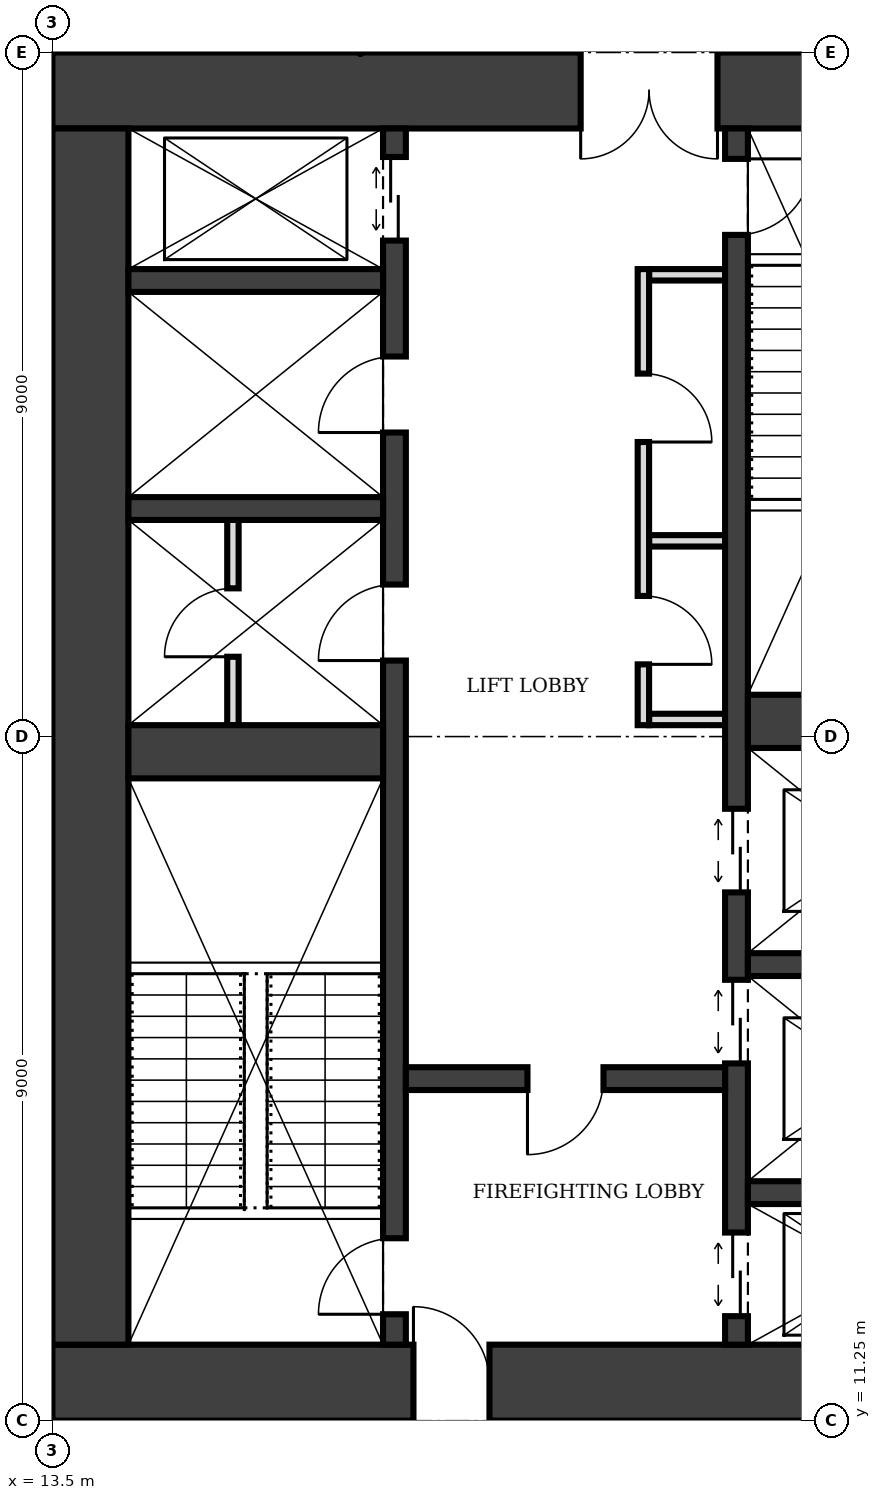
"""IFC4 building model, lengths in metres.
Left out: names, types, materials, properties, quantities, classifications, styles, units other than length and angle.
Written with IfcOpenShell. Run it as: python <this file> out.ifc"""

import sys

from ifc_helpers import new_model, si_unit, direction, frame, frame_2d, origin, place, context, subcontext, project, spatial, rectangle, extrude, element, fill, save


model = new_model("IFC4")
c1 = context("Model", 3, precision=1e-05, world=origin(), true_north=direction((0.0, 1.0)))
c2 = subcontext(c1, "Body", "Model", "MODEL_VIEW")
j1 = project(units=[si_unit("LENGTHUNIT", "METRE"), si_unit("PLANEANGLEUNIT", "RADIAN")], contexts=[c1])
p1 = place(None, origin())
s1 = spatial("IfcSite", under=j1, at=p1, CompositionType="ELEMENT")
p2 = place(p1, origin())
s2 = spatial("IfcBuilding", under=s1, at=p2, CompositionType="ELEMENT")
p3 = place(p2, frame((0.0, 0.0, 273.0)))
s3 = spatial("IfcBuildingStorey", under=s2, at=p3, CompositionType="ELEMENT", Elevation=273.0)
p4 = place(p3, frame((13.5, 11.75, 0.0), z_axis=(0.0, 0.0, 1.0), x_axis=(1.0, 0.0, 0.0)))
e1 = element("IfcWall", 1, at=p4, inside=s3, PredefinedType="SHEAR", context=c2, shape_type="SweptSolid", body=[
    extrude(rectangle(XDim=13.5, YDim=1.0, at=frame_2d((6.75, 0.0))), origin(), (0.0, 0.0, 1.0), 4.0),
])
p5 = place(p4, frame((4.75, 0.0, 0.0)))
e2 = element("IfcOpeningElement", 2, at=p5, cuts=e1, PredefinedType="OPENING", context=c2, shape_type="SweptSolid", body=[
    extrude(rectangle(XDim=1.0, YDim=2.1, at=frame_2d((0.5, 1.05))), frame((0.0, 0.51, 0.0), z_axis=(0.0, -1.0, 0.0), x_axis=(1.0, 0.0, 0.0)), (0.0, 0.0, 1.0), 1.02),
])
p6 = place(p3, frame((27.0, 28.75, 0.0), z_axis=(0.0, 0.0, 1.0), x_axis=(-1.0, 0.0, 0.0)))
e3 = element("IfcWall", 3, at=p6, inside=s3, PredefinedType="SHEAR", context=c2, shape_type="SweptSolid", body=[
    extrude(rectangle(XDim=13.5, YDim=1.0, at=frame_2d((6.75, 0.0))), origin(), (0.0, 0.0, 1.0), 4.0),
])
p7 = place(p6, frame((4.75, 0.0, 0.0)))
e4 = element("IfcOpeningElement", 4, at=p7, cuts=e3, PredefinedType="OPENING", context=c2, shape_type="SweptSolid", body=[
    extrude(rectangle(XDim=1.8, YDim=2.1, at=frame_2d((0.9, 1.05))), frame((0.0, 0.51, 0.0), z_axis=(0.0, -1.0, 0.0), x_axis=(1.0, 0.0, 0.0)), (0.0, 0.0, 1.0), 1.02),
])
p8 = place(p3, frame((14.0, 28.25, 0.0), z_axis=(0.0, 0.0, 1.0), x_axis=(0.0, -1.0, 0.0)))
e5 = element("IfcWall", 5, at=p8, inside=s3, PredefinedType="SHEAR", context=c2, shape_type="SweptSolid", body=[
    extrude(rectangle(XDim=16.0, YDim=1.0, at=frame_2d((8.0, 0.0))), origin(), (0.0, 0.0, 1.0), 4.0),
])
p9 = place(p3, frame((18.0, 12.25, 0.0), z_axis=(0.0, 0.0, 1.0), x_axis=(0.0, 1.0, 0.0)))
e6 = element("IfcWall", 6, at=p9, inside=s3, PredefinedType="SHEAR", context=c2, shape_type="SweptSolid", body=[
    extrude(rectangle(XDim=16.0, YDim=0.3, at=frame_2d((8.0, 0.0))), origin(), (0.0, 0.0, 1.0), 4.0),
])
p10 = place(p9, frame((0.4, 0.0, 0.0)))
e7 = element("IfcOpeningElement", 7, at=p10, cuts=e6, PredefinedType="OPENING", context=c2, shape_type="SweptSolid", body=[
    extrude(rectangle(XDim=1.0, YDim=2.1, at=frame_2d((0.5, 1.05))), frame((0.0, 0.16, 0.0), z_axis=(0.0, -1.0, 0.0), x_axis=(1.0, 0.0, 0.0)), (0.0, 0.0, 1.0), 0.32),
])
p11 = place(p9, frame((14.525, 0.0, 0.0)))
e8 = element("IfcOpeningElement", 8, at=p11, cuts=e6, PredefinedType="OPENING", context=c2, shape_type="SweptSolid", body=[
    extrude(rectangle(XDim=1.1, YDim=2.1, at=frame_2d((0.55, 1.05))), frame((0.0, 0.16, 0.0), z_axis=(0.0, -1.0, 0.0), x_axis=(1.0, 0.0, 0.0)), (0.0, 0.0, 1.0), 0.32),
])
p12 = place(p9, frame((9.0, 0.0, 0.0)))
e9 = element("IfcOpeningElement", 9, at=p12, cuts=e6, PredefinedType="OPENING", context=c2, shape_type="SweptSolid", body=[
    extrude(rectangle(XDim=1.0, YDim=2.1, at=frame_2d((0.5, 1.05))), frame((0.0, 0.16, 0.0), z_axis=(0.0, -1.0, 0.0), x_axis=(1.0, 0.0, 0.0)), (0.0, 0.0, 1.0), 0.32),
])
p13 = place(p9, frame((12.0, 0.0, 0.0)))
e10 = element("IfcOpeningElement", 10, at=p13, cuts=e6, PredefinedType="OPENING", context=c2, shape_type="SweptSolid", body=[
    extrude(rectangle(XDim=1.0, YDim=2.1, at=frame_2d((0.5, 1.05))), frame((0.0, 0.16, 0.0), z_axis=(0.0, -1.0, 0.0), x_axis=(1.0, 0.0, 0.0)), (0.0, 0.0, 1.0), 0.32),
])
p14 = place(p3, frame((22.5, 12.25, 0.0), z_axis=(0.0, 0.0, 1.0), x_axis=(0.0, 1.0, 0.0)))
e11 = element("IfcWall", 11, at=p14, inside=s3, PredefinedType="SHEAR", context=c2, shape_type="SweptSolid", body=[
    extrude(rectangle(XDim=16.0, YDim=0.3, at=frame_2d((8.0, 0.0))), origin(), (0.0, 0.0, 1.0), 4.0),
])
p15 = place(p14, frame((14.6, 0.0, 0.0)))
e12 = element("IfcOpeningElement", 12, at=p15, cuts=e11, PredefinedType="OPENING", context=c2, shape_type="SweptSolid", body=[
    extrude(rectangle(XDim=1.0, YDim=2.1, at=frame_2d((0.5, 1.05))), frame((0.0, 0.16, 0.0), z_axis=(0.0, -1.0, 0.0), x_axis=(1.0, 0.0, 0.0)), (0.0, 0.0, 1.0), 0.32),
])
p16 = place(p14, frame((0.375, 0.0, 0.0)))
e13 = element("IfcOpeningElement", 13, at=p16, cuts=e11, PredefinedType="OPENING", context=c2, shape_type="SweptSolid", body=[
    extrude(rectangle(XDim=1.1, YDim=2.1, at=frame_2d((0.55, 1.05))), frame((0.0, 0.16, 0.0), z_axis=(0.0, -1.0, 0.0), x_axis=(1.0, 0.0, 0.0)), (0.0, 0.0, 1.0), 0.32),
])
p17 = place(p14, frame((3.7, 0.0, 0.0)))
e14 = element("IfcOpeningElement", 14, at=p17, cuts=e11, PredefinedType="OPENING", context=c2, shape_type="SweptSolid", body=[
    extrude(rectangle(XDim=1.1, YDim=2.1, at=frame_2d((0.55, 1.05))), frame((0.0, 0.16, 0.0), z_axis=(0.0, -1.0, 0.0), x_axis=(1.0, 0.0, 0.0)), (0.0, 0.0, 1.0), 0.32),
])
p18 = place(p14, frame((5.95, 0.0, 0.0)))
e15 = element("IfcOpeningElement", 15, at=p18, cuts=e11, PredefinedType="OPENING", context=c2, shape_type="SweptSolid", body=[
    extrude(rectangle(XDim=1.1, YDim=2.1, at=frame_2d((0.55, 1.05))), frame((0.0, 0.16, 0.0), z_axis=(0.0, -1.0, 0.0), x_axis=(1.0, 0.0, 0.0)), (0.0, 0.0, 1.0), 0.32),
])
p19 = place(p3, frame((14.5, 20.05, 0.0), z_axis=(0.0, 0.0, 1.0), x_axis=(1.0, 0.0, 0.0)))
e16 = element("IfcWall", 16, at=p19, inside=s3, PredefinedType="SHEAR", context=c2, shape_type="SweptSolid", body=[
    extrude(rectangle(XDim=3.35, YDim=0.7, at=frame_2d((1.675, 0.0))), origin(), (0.0, 0.0, 1.0), 4.0),
])
p20 = place(p3, frame((18.15, 15.75, 0.0), z_axis=(0.0, 0.0, 1.0), x_axis=(1.0, 0.0, 0.0)))
e17 = element("IfcWall", 17, at=p20, inside=s3, PredefinedType="SHEAR", context=c2, shape_type="SweptSolid", body=[
    extrude(rectangle(XDim=4.2, YDim=0.3, at=frame_2d((2.1, 0.0))), origin(), (0.0, 0.0, 1.0), 4.0),
])
p21 = place(p20, frame((1.6, 0.0, 0.0)))
e18 = element("IfcOpeningElement", 18, at=p21, cuts=e17, PredefinedType="OPENING", context=c2, shape_type="SweptSolid", body=[
    extrude(rectangle(XDim=1.0, YDim=2.1, at=frame_2d((0.5, 1.05))), frame((0.0, 0.16, 0.0), z_axis=(0.0, -1.0, 0.0), x_axis=(1.0, 0.0, 0.0)), (0.0, 0.0, 1.0), 0.32),
])
for number, where, z_axis, x_axis in (
    (19, (22.65, 14.25, 0.0), (0.0, 0.0, 1.0), (1.0, 0.0, 0.0)),
    (20, (22.65, 17.25, 0.0), (0.0, 0.0, 1.0), (1.0, 0.0, 0.0)),
):
    element("IfcWall", number, at=place(p3, frame(where, z_axis=z_axis, x_axis=x_axis)), inside=s3, PredefinedType="SHEAR", context=c2, shape_type="SweptSolid", body=[
        extrude(rectangle(XDim=3.35, YDim=0.3, at=frame_2d((1.675, 0.0))), origin(), (0.0, 0.0, 1.0), 4.0),
    ])
p22 = place(p3, frame((22.65, 20.45, 0.0), z_axis=(0.0, 0.0, 1.0), x_axis=(1.0, 0.0, 0.0)))
e21 = element("IfcWall", 21, at=p22, inside=s3, PredefinedType="SHEAR", context=c2, shape_type="SweptSolid", body=[
    extrude(rectangle(XDim=3.35, YDim=0.7, at=frame_2d((1.675, 0.0))), origin(), (0.0, 0.0, 1.0), 4.0),
])
for number, where, z_axis, x_axis in (
    (22, (14.5, 23.25, 0.0), (0.0, 0.0, 1.0), (1.0, 0.0, 0.0)),
    (23, (14.5, 26.25, 0.0), (0.0, 0.0, 1.0), (1.0, 0.0, 0.0)),
):
    element("IfcWall", number, at=place(p3, frame(where, z_axis=z_axis, x_axis=x_axis)), inside=s3, PredefinedType="SHEAR", context=c2, shape_type="SweptSolid", body=[
        extrude(rectangle(XDim=3.35, YDim=0.3, at=frame_2d((1.675, 0.0))), origin(), (0.0, 0.0, 1.0), 4.0),
    ])
p23 = place(p3, frame((21.275, 20.4, 0.0), z_axis=(0.0, 0.0, 1.0), x_axis=(0.0, 1.0, 0.0)))
e24 = element("IfcWall", 24, at=p23, inside=s3, PredefinedType="PARTITIONING", context=c2, shape_type="SweptSolid", body=[
    extrude(rectangle(XDim=6.0, YDim=0.15, at=frame_2d((3.0, 0.0))), origin(), (0.0, 0.0, 1.0), 3.75),
])
p24 = place(p23, frame((0.8, 0.0, 0.0)))
e25 = element("IfcOpeningElement", 25, at=p24, cuts=e24, PredefinedType="OPENING", context=c2, shape_type="SweptSolid", body=[
    extrude(rectangle(XDim=0.9, YDim=2.1, at=frame_2d((0.45, 1.05))), frame((0.0, 0.085, 0.0), z_axis=(0.0, -1.0, 0.0), x_axis=(1.0, 0.0, 0.0)), (0.0, 0.0, 1.0), 0.17),
])
p25 = place(p23, frame((3.725, 0.0, 0.0)))
e26 = element("IfcOpeningElement", 26, at=p25, cuts=e24, PredefinedType="OPENING", context=c2, shape_type="SweptSolid", body=[
    extrude(rectangle(XDim=0.9, YDim=2.1, at=frame_2d((0.45, 1.05))), frame((0.0, 0.085, 0.0), z_axis=(0.0, -1.0, 0.0), x_axis=(1.0, 0.0, 0.0)), (0.0, 0.0, 1.0), 0.17),
])
for number, where, z_axis, x_axis in (
    (27, (21.35, 20.475, 0.0), (0.0, 0.0, 1.0), (1.0, 0.0, 0.0)),
    (28, (21.35, 22.825, 0.0), (0.0, 0.0, 1.0), (1.0, 0.0, 0.0)),
    (29, (21.35, 26.325, 0.0), (0.0, 0.0, 1.0), (1.0, 0.0, 0.0)),
):
    element("IfcWall", number, at=place(p3, frame(where, z_axis=z_axis, x_axis=x_axis)), inside=s3, PredefinedType="PARTITIONING", context=c2, shape_type="SweptSolid", body=[
        extrude(rectangle(XDim=1.0, YDim=0.15, at=frame_2d((0.5, 0.0))), origin(), (0.0, 0.0, 1.0), 3.75),
    ])
p26 = place(p3, frame((15.875, 20.4, 0.0), z_axis=(0.0, 0.0, 1.0), x_axis=(0.0, 1.0, 0.0)))
e30 = element("IfcWall", 30, at=p26, inside=s3, PredefinedType="PARTITIONING", context=c2, shape_type="SweptSolid", body=[
    extrude(rectangle(XDim=2.7, YDim=0.15, at=frame_2d((1.35, 0.0))), origin(), (0.0, 0.0, 1.0), 3.75),
])
p27 = place(p26, frame((0.9, 0.0, 0.0)))
e31 = element("IfcOpeningElement", 31, at=p27, cuts=e30, PredefinedType="OPENING", context=c2, shape_type="SweptSolid", body=[
    extrude(rectangle(XDim=0.9, YDim=2.1, at=frame_2d((0.45, 1.05))), frame((0.0, 0.085, 0.0), z_axis=(0.0, -1.0, 0.0), x_axis=(1.0, 0.0, 0.0)), (0.0, 0.0, 1.0), 0.17),
])
p28 = place(p5, origin())
e32 = element("IfcDoor", 32, at=p28, inside=s3, OperationType="SINGLE_SWING_LEFT", PredefinedType="DOOR", context=c2, shape_type="SweptSolid", body=[
    extrude(rectangle(XDim=1.0, YDim=2.1, at=frame_2d((0.5, 1.05))), frame((0.0, 0.025, 0.0), z_axis=(0.0, -1.0, 0.0), x_axis=(1.0, 0.0, 0.0)), (0.0, 0.0, 1.0), 0.05),
])
fill(e2, e32)
p29 = place(p7, origin())
e33 = element("IfcDoor", 33, at=p29, inside=s3, OperationType="DOUBLE_DOOR_SINGLE_SWING", PredefinedType="DOOR", context=c2, shape_type="SweptSolid", body=[
    extrude(rectangle(XDim=1.8, YDim=2.1, at=frame_2d((0.9, 1.05))), frame((0.0, 0.025, 0.0), z_axis=(0.0, -1.0, 0.0), x_axis=(1.0, 0.0, 0.0)), (0.0, 0.0, 1.0), 0.05),
])
fill(e4, e33)
p30 = place(p21, frame((1.0, 0.0, 0.0), z_axis=(0.0, 0.0, 1.0), x_axis=(-1.0, 0.0, 0.0)))
e34 = element("IfcDoor", 34, at=p30, inside=s3, OperationType="SINGLE_SWING_RIGHT", PredefinedType="DOOR", context=c2, shape_type="SweptSolid", body=[
    extrude(rectangle(XDim=1.0, YDim=2.1, at=frame_2d((0.5, 1.05))), frame((0.0, 0.025, 0.0), z_axis=(0.0, -1.0, 0.0), x_axis=(1.0, 0.0, 0.0)), (0.0, 0.0, 1.0), 0.05),
])
fill(e18, e34)
p31 = place(p10, origin())
e35 = element("IfcDoor", 35, at=p31, inside=s3, OperationType="SINGLE_SWING_LEFT", PredefinedType="DOOR", context=c2, shape_type="SweptSolid", body=[
    extrude(rectangle(XDim=1.0, YDim=2.1, at=frame_2d((0.5, 1.05))), frame((0.0, 0.025, 0.0), z_axis=(0.0, -1.0, 0.0), x_axis=(1.0, 0.0, 0.0)), (0.0, 0.0, 1.0), 0.05),
])
fill(e7, e35)
p32 = place(p15, frame((1.0, 0.0, 0.0), z_axis=(0.0, 0.0, 1.0), x_axis=(-1.0, 0.0, 0.0)))
e36 = element("IfcDoor", 36, at=p32, inside=s3, OperationType="SINGLE_SWING_LEFT", PredefinedType="DOOR", context=c2, shape_type="SweptSolid", body=[
    extrude(rectangle(XDim=1.0, YDim=2.1, at=frame_2d((0.5, 1.05))), frame((0.0, 0.025, 0.0), z_axis=(0.0, -1.0, 0.0), x_axis=(1.0, 0.0, 0.0)), (0.0, 0.0, 1.0), 0.05),
])
fill(e12, e36)
p33 = place(p16, origin())
e37 = element("IfcDoor", 37, at=p33, inside=s3, OperationType="DOUBLE_DOOR_SLIDING", PredefinedType="DOOR", context=c2, shape_type="SweptSolid", body=[
    extrude(rectangle(XDim=1.1, YDim=2.1, at=frame_2d((0.55, 1.05))), frame((0.0, 0.025, 0.0), z_axis=(0.0, -1.0, 0.0), x_axis=(1.0, 0.0, 0.0)), (0.0, 0.0, 1.0), 0.05),
])
fill(e13, e37)
p34 = place(p11, origin())
e38 = element("IfcDoor", 38, at=p34, inside=s3, OperationType="DOUBLE_DOOR_SLIDING", PredefinedType="DOOR", context=c2, shape_type="SweptSolid", body=[
    extrude(rectangle(XDim=1.1, YDim=2.1, at=frame_2d((0.55, 1.05))), frame((0.0, 0.025, 0.0), z_axis=(0.0, -1.0, 0.0), x_axis=(1.0, 0.0, 0.0)), (0.0, 0.0, 1.0), 0.05),
])
fill(e8, e38)
p35 = place(p17, origin())
e39 = element("IfcDoor", 39, at=p35, inside=s3, OperationType="DOUBLE_DOOR_SLIDING", PredefinedType="DOOR", context=c2, shape_type="SweptSolid", body=[
    extrude(rectangle(XDim=1.1, YDim=2.1, at=frame_2d((0.55, 1.05))), frame((0.0, 0.025, 0.0), z_axis=(0.0, -1.0, 0.0), x_axis=(1.0, 0.0, 0.0)), (0.0, 0.0, 1.0), 0.05),
])
fill(e14, e39)
p36 = place(p18, origin())
e40 = element("IfcDoor", 40, at=p36, inside=s3, OperationType="DOUBLE_DOOR_SLIDING", PredefinedType="DOOR", context=c2, shape_type="SweptSolid", body=[
    extrude(rectangle(XDim=1.1, YDim=2.1, at=frame_2d((0.55, 1.05))), frame((0.0, 0.025, 0.0), z_axis=(0.0, -1.0, 0.0), x_axis=(1.0, 0.0, 0.0)), (0.0, 0.0, 1.0), 0.05),
])
fill(e15, e40)
p37 = place(p24, frame((0.9, 0.0, 0.0), z_axis=(0.0, 0.0, 1.0), x_axis=(-1.0, 0.0, 0.0)))
e41 = element("IfcDoor", 41, at=p37, inside=s3, OperationType="SINGLE_SWING_RIGHT", PredefinedType="DOOR", context=c2, shape_type="SweptSolid", body=[
    extrude(rectangle(XDim=0.9, YDim=2.1, at=frame_2d((0.45, 1.05))), frame((0.0, 0.025, 0.0), z_axis=(0.0, -1.0, 0.0), x_axis=(1.0, 0.0, 0.0)), (0.0, 0.0, 1.0), 0.05),
])
fill(e25, e41)
p38 = place(p25, frame((0.9, 0.0, 0.0), z_axis=(0.0, 0.0, 1.0), x_axis=(-1.0, 0.0, 0.0)))
e42 = element("IfcDoor", 42, at=p38, inside=s3, OperationType="SINGLE_SWING_RIGHT", PredefinedType="DOOR", context=c2, shape_type="SweptSolid", body=[
    extrude(rectangle(XDim=0.9, YDim=2.1, at=frame_2d((0.45, 1.05))), frame((0.0, 0.025, 0.0), z_axis=(0.0, -1.0, 0.0), x_axis=(1.0, 0.0, 0.0)), (0.0, 0.0, 1.0), 0.05),
])
fill(e26, e42)
p39 = place(p12, origin())
e43 = element("IfcDoor", 43, at=p39, inside=s3, OperationType="SINGLE_SWING_LEFT", PredefinedType="DOOR", context=c2, shape_type="SweptSolid", body=[
    extrude(rectangle(XDim=1.0, YDim=2.1, at=frame_2d((0.5, 1.05))), frame((0.0, 0.025, 0.0), z_axis=(0.0, -1.0, 0.0), x_axis=(1.0, 0.0, 0.0)), (0.0, 0.0, 1.0), 0.05),
])
fill(e9, e43)
p40 = place(p27, origin())
e44 = element("IfcDoor", 44, at=p40, inside=s3, OperationType="SINGLE_SWING_LEFT", PredefinedType="DOOR", context=c2, shape_type="SweptSolid", body=[
    extrude(rectangle(XDim=0.9, YDim=2.1, at=frame_2d((0.45, 1.05))), frame((0.0, 0.025, 0.0), z_axis=(0.0, -1.0, 0.0), x_axis=(1.0, 0.0, 0.0)), (0.0, 0.0, 1.0), 0.05),
])
fill(e31, e44)
p41 = place(p13, origin())
e45 = element("IfcDoor", 45, at=p41, inside=s3, OperationType="SINGLE_SWING_LEFT", PredefinedType="DOOR", context=c2, shape_type="SweptSolid", body=[
    extrude(rectangle(XDim=1.0, YDim=2.1, at=frame_2d((0.5, 1.05))), frame((0.0, 0.025, 0.0), z_axis=(0.0, -1.0, 0.0), x_axis=(1.0, 0.0, 0.0)), (0.0, 0.0, 1.0), 0.05),
])
fill(e10, e45)
save(model, sys.argv[1])
